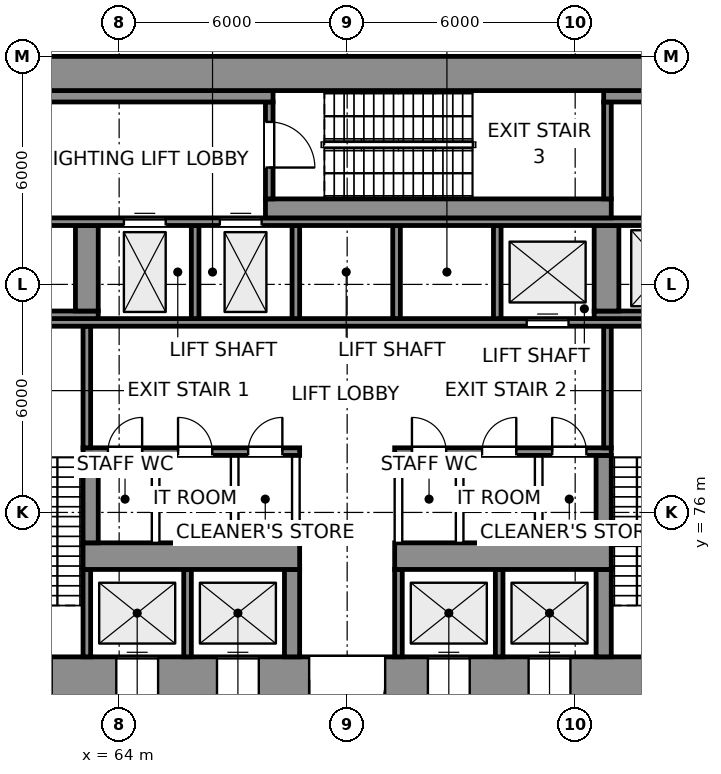
"""IFC4 building model, lengths in metres.
Left out: names, types, materials, properties, quantities, classifications, styles, units other than length and angle.
Written with IfcOpenShell. Run it as: python <this file> out.ifc"""

import sys

from ifc_helpers import new_model, si_unit, direction, frame, frame_2d, origin, place, context, subcontext, project, spatial, rectangle, extrude, element, fill, save


model = new_model("IFC4")
c1 = context("Model", 3, precision=1e-05, world=origin(), true_north=direction((0.0, 1.0)))
c2 = subcontext(c1, "Body", "Model", "MODEL_VIEW")
j1 = project(units=[si_unit("LENGTHUNIT", "METRE"), si_unit("PLANEANGLEUNIT", "RADIAN")], contexts=[c1])
p1 = place(None, origin())
s1 = spatial("IfcSite", under=j1, at=p1, CompositionType="ELEMENT")
p2 = place(p1, origin())
s2 = spatial("IfcBuilding", under=s1, at=p2, CompositionType="ELEMENT")
p3 = place(p2, frame((0.0, 0.0, 9.0)))
s3 = spatial("IfcBuildingStorey", under=s2, at=p3, CompositionType="ELEMENT", Elevation=9.0)
p4 = place(p3, frame((59.0, 71.6, 0.0), z_axis=(0.0, 0.0, 1.0), x_axis=(1.0, 0.0, 0.0)))
e1 = element("IfcWall", 1, at=p4, inside=s3, PredefinedType="SHEAR", context=c2, shape_type="SweptSolid", body=[
    extrude(rectangle(XDim=22.0, YDim=1.2, at=frame_2d((11.0, 0.0))), origin(), (0.0, 0.0, 1.0), 6.0),
])
p5 = place(p4, frame((2.025, 0.0, 0.0)))
e2 = element("IfcOpeningElement", 2, at=p5, cuts=e1, PredefinedType="OPENING", context=c2, shape_type="SweptSolid", body=[
    extrude(rectangle(XDim=1.2, YDim=2.1, at=frame_2d((0.6, 1.05))), frame((0.0, 0.61, 0.0), z_axis=(0.0, -1.0, 0.0), x_axis=(1.0, 0.0, 0.0)), (0.0, 0.0, 1.0), 1.22),
])
p6 = place(p4, frame((18.775, 0.0, 0.0)))
e3 = element("IfcOpeningElement", 3, at=p6, cuts=e1, PredefinedType="OPENING", context=c2, shape_type="SweptSolid", body=[
    extrude(rectangle(XDim=1.2, YDim=2.1, at=frame_2d((0.6, 1.05))), frame((0.0, 0.61, 0.0), z_axis=(0.0, -1.0, 0.0), x_axis=(1.0, 0.0, 0.0)), (0.0, 0.0, 1.0), 1.22),
])
p7 = place(p4, frame((10.0, 0.0, 0.0)))
e4 = element("IfcOpeningElement", 4, at=p7, cuts=e1, PredefinedType="OPENING", context=c2, shape_type="SweptSolid", body=[
    extrude(rectangle(XDim=2.0, YDim=2.1, at=frame_2d((1.0, 1.05))), frame((0.0, 0.61, 0.0), z_axis=(0.0, -1.0, 0.0), x_axis=(1.0, 0.0, 0.0)), (0.0, 0.0, 1.0), 1.22),
])
p8 = place(p4, frame((4.925, 0.0, 0.0)))
e5 = element("IfcOpeningElement", 5, at=p8, cuts=e1, PredefinedType="OPENING", context=c2, shape_type="SweptSolid", body=[
    extrude(rectangle(XDim=1.1, YDim=2.1, at=frame_2d((0.55, 1.05))), frame((0.0, 0.61, 0.0), z_axis=(0.0, -1.0, 0.0), x_axis=(1.0, 0.0, 0.0)), (0.0, 0.0, 1.0), 1.22),
])
p9 = place(p4, frame((7.575, 0.0, 0.0)))
e6 = element("IfcOpeningElement", 6, at=p9, cuts=e1, PredefinedType="OPENING", context=c2, shape_type="SweptSolid", body=[
    extrude(rectangle(XDim=1.1, YDim=2.1, at=frame_2d((0.55, 1.05))), frame((0.0, 0.61, 0.0), z_axis=(0.0, -1.0, 0.0), x_axis=(1.0, 0.0, 0.0)), (0.0, 0.0, 1.0), 1.22),
])
p10 = place(p4, frame((13.125, 0.0, 0.0)))
e7 = element("IfcOpeningElement", 7, at=p10, cuts=e1, PredefinedType="OPENING", context=c2, shape_type="SweptSolid", body=[
    extrude(rectangle(XDim=1.1, YDim=2.1, at=frame_2d((0.55, 1.05))), frame((0.0, 0.61, 0.0), z_axis=(0.0, -1.0, 0.0), x_axis=(1.0, 0.0, 0.0)), (0.0, 0.0, 1.0), 1.22),
])
p11 = place(p4, frame((15.775, 0.0, 0.0)))
e8 = element("IfcOpeningElement", 8, at=p11, cuts=e1, PredefinedType="OPENING", context=c2, shape_type="SweptSolid", body=[
    extrude(rectangle(XDim=1.1, YDim=2.1, at=frame_2d((0.55, 1.05))), frame((0.0, 0.61, 0.0), z_axis=(0.0, -1.0, 0.0), x_axis=(1.0, 0.0, 0.0)), (0.0, 0.0, 1.0), 1.22),
])
for number, where, z_axis, x_axis in (
    (9, (63.15, 72.2, 0.0), (0.0, 0.0, 1.0), (0.0, 1.0, 0.0)),
    (10, (65.8, 72.2, 0.0), (0.0, 0.0, 1.0), (0.0, 1.0, 0.0)),
):
    element("IfcWall", number, at=place(p3, frame(where, z_axis=z_axis, x_axis=x_axis)), inside=s3, PredefinedType="SHEAR", context=c2, shape_type="SweptSolid", body=[
        extrude(rectangle(XDim=2.3, YDim=0.2, at=frame_2d((1.15, 0.0))), origin(), (0.0, 0.0, 1.0), 6.0),
    ])
p12 = place(p3, frame((68.55, 72.2, 0.0), z_axis=(0.0, 0.0, 1.0), x_axis=(0.0, 1.0, 0.0)))
e11 = element("IfcWall", 11, at=p12, inside=s3, PredefinedType="SHEAR", context=c2, shape_type="SweptSolid", body=[
    extrude(rectangle(XDim=2.3, YDim=0.4, at=frame_2d((1.15, 0.0))), origin(), (0.0, 0.0, 1.0), 6.0),
])
for number, where, z_axis, x_axis in (
    (12, (71.35, 72.2, 0.0), (0.0, 0.0, 1.0), (0.0, 1.0, 0.0)),
    (13, (74.0, 72.2, 0.0), (0.0, 0.0, 1.0), (0.0, 1.0, 0.0)),
):
    element("IfcWall", number, at=place(p3, frame(where, z_axis=z_axis, x_axis=x_axis)), inside=s3, PredefinedType="SHEAR", context=c2, shape_type="SweptSolid", body=[
        extrude(rectangle(XDim=2.3, YDim=0.2, at=frame_2d((1.15, 0.0))), origin(), (0.0, 0.0, 1.0), 6.0),
    ])
p13 = place(p3, frame((76.75, 72.2, 0.0), z_axis=(0.0, 0.0, 1.0), x_axis=(0.0, 1.0, 0.0)))
e14 = element("IfcWall", 14, at=p13, inside=s3, PredefinedType="SHEAR", context=c2, shape_type="SweptSolid", body=[
    extrude(rectangle(XDim=2.3, YDim=0.4, at=frame_2d((1.15, 0.0))), origin(), (0.0, 0.0, 1.0), 6.0),
])
for number, where, z_axis, x_axis in (
    (15, (63.05, 74.85, 0.0), (0.0, 0.0, 1.0), (1.0, 0.0, 0.0)),
    (16, (71.25, 74.85, 0.0), (0.0, 0.0, 1.0), (1.0, 0.0, 0.0)),
):
    element("IfcWall", number, at=place(p3, frame(where, z_axis=z_axis, x_axis=x_axis)), inside=s3, PredefinedType="SHEAR", context=c2, shape_type="SweptSolid", body=[
        extrude(rectangle(XDim=5.7, YDim=0.7, at=frame_2d((2.85, 0.0))), origin(), (0.0, 0.0, 1.0), 6.0),
    ])
p14 = place(p3, frame((63.25, 75.2, 0.0), z_axis=(0.0, 0.0, 1.0), x_axis=(0.0, 1.0, 0.0)))
e17 = element("IfcWall", 17, at=p14, inside=s3, PredefinedType="SHEAR", context=c2, shape_type="SweptSolid", body=[
    extrude(rectangle(XDim=2.3, YDim=0.4, at=frame_2d((1.15, 0.0))), origin(), (0.0, 0.0, 1.0), 6.0),
])
for number, where, z_axis, x_axis in (
    (18, (64.96, 75.2, 0.0), (0.0, 0.0, 1.0), (0.0, 1.0, 0.0)),
    (19, (67.04, 75.2, 0.0), (0.0, 0.0, 1.0), (0.0, 1.0, 0.0)),
    (20, (68.65, 75.2, 0.0), (0.0, 0.0, 1.0), (0.0, 1.0, 0.0)),
    (21, (71.35, 75.2, 0.0), (0.0, 0.0, 1.0), (0.0, 1.0, 0.0)),
    (22, (72.96, 75.2, 0.0), (0.0, 0.0, 1.0), (0.0, 1.0, 0.0)),
    (23, (75.04, 75.2, 0.0), (0.0, 0.0, 1.0), (0.0, 1.0, 0.0)),
):
    element("IfcWall", number, at=place(p3, frame(where, z_axis=z_axis, x_axis=x_axis)), inside=s3, PredefinedType="PARTITIONING", context=c2, shape_type="SweptSolid", body=[
        extrude(rectangle(XDim=2.3, YDim=0.2, at=frame_2d((1.15, 0.0))), origin(), (0.0, 0.0, 1.0), 5.65),
    ])
p15 = place(p3, frame((76.75, 75.2, 0.0), z_axis=(0.0, 0.0, 1.0), x_axis=(0.0, 1.0, 0.0)))
e24 = element("IfcWall", 24, at=p15, inside=s3, PredefinedType="SHEAR", context=c2, shape_type="SweptSolid", body=[
    extrude(rectangle(XDim=2.3, YDim=0.4, at=frame_2d((1.15, 0.0))), origin(), (0.0, 0.0, 1.0), 6.0),
])
p16 = place(p3, frame((63.05, 77.6, 0.0), z_axis=(0.0, 0.0, 1.0), x_axis=(1.0, 0.0, 0.0)))
e25 = element("IfcWall", 25, at=p16, inside=s3, PredefinedType="SHEAR", context=c2, shape_type="SweptSolid", body=[
    extrude(rectangle(XDim=5.7, YDim=0.2, at=frame_2d((2.85, 0.0))), origin(), (0.0, 0.0, 1.0), 6.0),
])
p17 = place(p16, frame((0.655, 0.0, 0.0)))
e26 = element("IfcOpeningElement", 26, at=p17, cuts=e25, PredefinedType="OPENING", context=c2, shape_type="SweptSolid", body=[
    extrude(rectangle(XDim=0.9, YDim=2.1, at=frame_2d((0.45, 1.05))), frame((0.0, 0.11, 0.0), z_axis=(0.0, -1.0, 0.0), x_axis=(1.0, 0.0, 0.0)), (0.0, 0.0, 1.0), 0.22),
])
p18 = place(p16, frame((2.5, 0.0, 0.0)))
e27 = element("IfcOpeningElement", 27, at=p18, cuts=e25, PredefinedType="OPENING", context=c2, shape_type="SweptSolid", body=[
    extrude(rectangle(XDim=0.9, YDim=2.1, at=frame_2d((0.45, 1.05))), frame((0.0, 0.11, 0.0), z_axis=(0.0, -1.0, 0.0), x_axis=(1.0, 0.0, 0.0)), (0.0, 0.0, 1.0), 0.22),
])
p19 = place(p16, frame((4.345, 0.0, 0.0)))
e28 = element("IfcOpeningElement", 28, at=p19, cuts=e25, PredefinedType="OPENING", context=c2, shape_type="SweptSolid", body=[
    extrude(rectangle(XDim=0.9, YDim=2.1, at=frame_2d((0.45, 1.05))), frame((0.0, 0.11, 0.0), z_axis=(0.0, -1.0, 0.0), x_axis=(1.0, 0.0, 0.0)), (0.0, 0.0, 1.0), 0.22),
])
p20 = place(p3, frame((71.25, 77.6, 0.0), z_axis=(0.0, 0.0, 1.0), x_axis=(1.0, 0.0, 0.0)))
e29 = element("IfcWall", 29, at=p20, inside=s3, PredefinedType="SHEAR", context=c2, shape_type="SweptSolid", body=[
    extrude(rectangle(XDim=5.7, YDim=0.2, at=frame_2d((2.85, 0.0))), origin(), (0.0, 0.0, 1.0), 6.0),
])
p21 = place(p20, frame((0.455, 0.0, 0.0)))
e30 = element("IfcOpeningElement", 30, at=p21, cuts=e29, PredefinedType="OPENING", context=c2, shape_type="SweptSolid", body=[
    extrude(rectangle(XDim=0.9, YDim=2.1, at=frame_2d((0.45, 1.05))), frame((0.0, 0.11, 0.0), z_axis=(0.0, -1.0, 0.0), x_axis=(1.0, 0.0, 0.0)), (0.0, 0.0, 1.0), 0.22),
])
p22 = place(p20, frame((2.3, 0.0, 0.0)))
e31 = element("IfcOpeningElement", 31, at=p22, cuts=e29, PredefinedType="OPENING", context=c2, shape_type="SweptSolid", body=[
    extrude(rectangle(XDim=0.9, YDim=2.1, at=frame_2d((0.45, 1.05))), frame((0.0, 0.11, 0.0), z_axis=(0.0, -1.0, 0.0), x_axis=(1.0, 0.0, 0.0)), (0.0, 0.0, 1.0), 0.22),
])
p23 = place(p20, frame((4.145, 0.0, 0.0)))
e32 = element("IfcOpeningElement", 32, at=p23, cuts=e29, PredefinedType="OPENING", context=c2, shape_type="SweptSolid", body=[
    extrude(rectangle(XDim=0.9, YDim=2.1, at=frame_2d((0.45, 1.05))), frame((0.0, 0.11, 0.0), z_axis=(0.0, -1.0, 0.0), x_axis=(1.0, 0.0, 0.0)), (0.0, 0.0, 1.0), 0.22),
])
for number, where, z_axis, x_axis in (
    (33, (63.15, 77.7, 0.0), (0.0, 0.0, 1.0), (0.0, 1.0, 0.0)),
    (34, (76.85, 77.7, 0.0), (0.0, 0.0, 1.0), (0.0, 1.0, 0.0)),
):
    element("IfcWall", number, at=place(p3, frame(where, z_axis=z_axis, x_axis=x_axis)), inside=s3, PredefinedType="SHEAR", context=c2, shape_type="SweptSolid", body=[
        extrude(rectangle(XDim=3.2, YDim=0.2, at=frame_2d((1.6, 0.0))), origin(), (0.0, 0.0, 1.0), 6.0),
    ])
p24 = place(p3, frame((59.0, 81.0, 0.0), z_axis=(0.0, 0.0, 1.0), x_axis=(1.0, 0.0, 0.0)))
e35 = element("IfcWall", 35, at=p24, inside=s3, PredefinedType="SHEAR", context=c2, shape_type="SweptSolid", body=[
    extrude(rectangle(XDim=22.0, YDim=0.2, at=frame_2d((11.0, 0.0))), origin(), (0.0, 0.0, 1.0), 6.0),
])
p25 = place(p24, frame((15.725, 0.0, 0.0)))
e36 = element("IfcOpeningElement", 36, at=p25, cuts=e35, PredefinedType="OPENING", context=c2, shape_type="SweptSolid", body=[
    extrude(rectangle(XDim=1.1, YDim=2.1, at=frame_2d((0.55, 1.05))), frame((0.0, 0.11, 0.0), z_axis=(0.0, -1.0, 0.0), x_axis=(1.0, 0.0, 0.0)), (0.0, 0.0, 1.0), 0.22),
])
p26 = place(p3, frame((59.0, 81.2, 0.0), z_axis=(0.0, 0.0, 1.0), x_axis=(1.0, 0.0, 0.0)))
e37 = element("IfcWall", 37, at=p26, inside=s3, PredefinedType="SHEAR", context=c2, shape_type="SweptSolid", body=[
    extrude(rectangle(XDim=4.45, YDim=0.2, at=frame_2d((2.225, 0.0))), origin(), (0.0, 0.0, 1.0), 6.0),
])
for number, where, z_axis, x_axis in (
    (38, (66.0, 81.1, 0.0), (0.0, 0.0, 1.0), (0.0, 1.0, 0.0)),
    (39, (68.65, 81.1, 0.0), (0.0, 0.0, 1.0), (0.0, 1.0, 0.0)),
    (40, (71.3, 81.1, 0.0), (0.0, 0.0, 1.0), (0.0, 1.0, 0.0)),
    (41, (73.95, 81.1, 0.0), (0.0, 0.0, 1.0), (0.0, 1.0, 0.0)),
):
    element("IfcWall", number, at=place(p3, frame(where, z_axis=z_axis, x_axis=x_axis)), inside=s3, PredefinedType="SHEAR", context=c2, shape_type="SweptSolid", body=[
        extrude(rectangle(XDim=2.45, YDim=0.2, at=frame_2d((1.225, 0.0))), origin(), (0.0, 0.0, 1.0), 6.0),
    ])
p27 = place(p3, frame((76.5, 81.2, 0.0), z_axis=(0.0, 0.0, 1.0), x_axis=(1.0, 0.0, 0.0)))
e42 = element("IfcWall", 42, at=p27, inside=s3, PredefinedType="SHEAR", context=c2, shape_type="SweptSolid", body=[
    extrude(rectangle(XDim=4.5, YDim=0.2, at=frame_2d((2.25, 0.0))), origin(), (0.0, 0.0, 1.0), 6.0),
])
p28 = place(p3, frame((63.15, 81.3, 0.0), z_axis=(0.0, 0.0, 1.0), x_axis=(0.0, 1.0, 0.0)))
e43 = element("IfcWall", 43, at=p28, inside=s3, PredefinedType="SHEAR", context=c2, shape_type="SweptSolid", body=[
    extrude(rectangle(XDim=2.25, YDim=0.6, at=frame_2d((1.125, 0.0))), origin(), (0.0, 0.0, 1.0), 6.0),
])
p29 = place(p3, frame((76.825, 81.3, 0.0), z_axis=(0.0, 0.0, 1.0), x_axis=(0.0, 1.0, 0.0)))
e44 = element("IfcWall", 44, at=p29, inside=s3, PredefinedType="SHEAR", context=c2, shape_type="SweptSolid", body=[
    extrude(rectangle(XDim=2.25, YDim=0.65, at=frame_2d((1.125, 0.0))), origin(), (0.0, 0.0, 1.0), 6.0),
])
p30 = place(p3, frame((59.0, 83.65, 0.0), z_axis=(0.0, 0.0, 1.0), x_axis=(1.0, 0.0, 0.0)))
e45 = element("IfcWall", 45, at=p30, inside=s3, PredefinedType="SHEAR", context=c2, shape_type="SweptSolid", body=[
    extrude(rectangle(XDim=22.0, YDim=0.2, at=frame_2d((11.0, 0.0))), origin(), (0.0, 0.0, 1.0), 6.0),
])
p31 = place(p30, frame((5.125, 0.0, 0.0)))
e46 = element("IfcOpeningElement", 46, at=p31, cuts=e45, PredefinedType="OPENING", context=c2, shape_type="SweptSolid", body=[
    extrude(rectangle(XDim=1.1, YDim=2.1, at=frame_2d((0.55, 1.05))), frame((0.0, 0.11, 0.0), z_axis=(0.0, -1.0, 0.0), x_axis=(1.0, 0.0, 0.0)), (0.0, 0.0, 1.0), 0.22),
])
p32 = place(p30, frame((7.65, 0.0, 0.0)))
e47 = element("IfcOpeningElement", 47, at=p32, cuts=e45, PredefinedType="OPENING", context=c2, shape_type="SweptSolid", body=[
    extrude(rectangle(XDim=1.1, YDim=2.1, at=frame_2d((0.55, 1.05))), frame((0.0, 0.11, 0.0), z_axis=(0.0, -1.0, 0.0), x_axis=(1.0, 0.0, 0.0)), (0.0, 0.0, 1.0), 0.22),
])
p33 = place(p30, frame((18.775, 0.0, 0.0)))
e48 = element("IfcOpeningElement", 48, at=p33, cuts=e45, PredefinedType="OPENING", context=c2, shape_type="SweptSolid", body=[
    extrude(rectangle(XDim=1.2, YDim=2.1, at=frame_2d((0.6, 1.05))), frame((0.0, 0.11, 0.0), z_axis=(0.0, -1.0, 0.0), x_axis=(1.0, 0.0, 0.0)), (0.0, 0.0, 1.0), 0.22),
])
p34 = place(p30, frame((2.075, 0.0, 0.0)))
e49 = element("IfcOpeningElement", 49, at=p34, cuts=e45, PredefinedType="OPENING", context=c2, shape_type="SweptSolid", body=[
    extrude(rectangle(XDim=1.1, YDim=2.1, at=frame_2d((0.55, 1.05))), frame((0.0, 0.11, 0.0), z_axis=(0.0, -1.0, 0.0), x_axis=(1.0, 0.0, 0.0)), (0.0, 0.0, 1.0), 0.22),
])
p35 = place(p3, frame((67.85, 84.0, 0.0), z_axis=(0.0, 0.0, 1.0), x_axis=(1.0, 0.0, 0.0)))
e50 = element("IfcWall", 50, at=p35, inside=s3, PredefinedType="SHEAR", context=c2, shape_type="SweptSolid", body=[
    extrude(rectangle(XDim=9.1, YDim=0.5, at=frame_2d((4.55, 0.0))), origin(), (0.0, 0.0, 1.0), 6.0),
])
p36 = place(p3, frame((67.95, 84.25, 0.0), z_axis=(0.0, 0.0, 1.0), x_axis=(0.0, 1.0, 0.0)))
e51 = element("IfcWall", 51, at=p36, inside=s3, PredefinedType="SHEAR", context=c2, shape_type="SweptSolid", body=[
    extrude(rectangle(XDim=2.55, YDim=0.2, at=frame_2d((1.275, 0.0))), origin(), (0.0, 0.0, 1.0), 6.0),
])
p37 = place(p36, frame((0.825, 0.0, 0.0)))
e52 = element("IfcOpeningElement", 52, at=p37, cuts=e51, PredefinedType="OPENING", context=c2, shape_type="SweptSolid", body=[
    extrude(rectangle(XDim=1.2, YDim=2.1, at=frame_2d((0.6, 1.05))), frame((0.0, 0.11, 0.0), z_axis=(0.0, -1.0, 0.0), x_axis=(1.0, 0.0, 0.0)), (0.0, 0.0, 1.0), 0.22),
])
p38 = place(p3, frame((76.85, 84.25, 0.0), z_axis=(0.0, 0.0, 1.0), x_axis=(0.0, 1.0, 0.0)))
e53 = element("IfcWall", 53, at=p38, inside=s3, PredefinedType="SHEAR", context=c2, shape_type="SweptSolid", body=[
    extrude(rectangle(XDim=2.55, YDim=0.2, at=frame_2d((1.275, 0.0))), origin(), (0.0, 0.0, 1.0), 6.0),
])
p39 = place(p3, frame((59.0, 86.95, 0.0), z_axis=(0.0, 0.0, 1.0), x_axis=(1.0, 0.0, 0.0)))
e54 = element("IfcWall", 54, at=p39, inside=s3, PredefinedType="SHEAR", context=c2, shape_type="SweptSolid", body=[
    extrude(rectangle(XDim=9.05, YDim=0.3, at=frame_2d((4.525, 0.0))), origin(), (0.0, 0.0, 1.0), 6.0),
])
p40 = place(p3, frame((76.75, 86.95, 0.0), z_axis=(0.0, 0.0, 1.0), x_axis=(1.0, 0.0, 0.0)))
e55 = element("IfcWall", 55, at=p40, inside=s3, PredefinedType="SHEAR", context=c2, shape_type="SweptSolid", body=[
    extrude(rectangle(XDim=4.25, YDim=0.3, at=frame_2d((2.125, 0.0))), origin(), (0.0, 0.0, 1.0), 6.0),
])
p41 = place(p3, frame((59.0, 87.55, 0.0), z_axis=(0.0, 0.0, 1.0), x_axis=(1.0, 0.0, 0.0)))
e56 = element("IfcWall", 56, at=p41, inside=s3, PredefinedType="SHEAR", context=c2, shape_type="SweptSolid", body=[
    extrude(rectangle(XDim=22.0, YDim=0.9, at=frame_2d((11.0, 0.0))), origin(), (0.0, 0.0, 1.0), 6.0),
])
p42 = place(p37, frame((1.2, 0.0, 0.0), z_axis=(0.0, 0.0, 1.0), x_axis=(-1.0, 0.0, 0.0)))
e57 = element("IfcDoor", 57, at=p42, inside=s3, OperationType="SINGLE_SWING_RIGHT", PredefinedType="DOOR", context=c2, shape_type="SweptSolid", body=[
    extrude(rectangle(XDim=1.2, YDim=2.1, at=frame_2d((0.6, 1.05))), frame((0.0, 0.025, 0.0), z_axis=(0.0, -1.0, 0.0), x_axis=(1.0, 0.0, 0.0)), (0.0, 0.0, 1.0), 0.05),
])
fill(e52, e57)
p43 = place(p7, frame((2.0, 0.0, 0.0), z_axis=(0.0, 0.0, 1.0), x_axis=(-1.0, 0.0, 0.0)))
e58 = element("IfcDoor", 58, at=p43, inside=s3, OperationType="DOUBLE_DOOR_SINGLE_SWING", PredefinedType="DOOR", context=c2, shape_type="SweptSolid", body=[
    extrude(rectangle(XDim=2.0, YDim=2.1, at=frame_2d((1.0, 1.05))), frame((0.0, 0.025, 0.0), z_axis=(0.0, -1.0, 0.0), x_axis=(1.0, 0.0, 0.0)), (0.0, 0.0, 1.0), 0.05),
])
fill(e4, e58)
p44 = place(p31, origin())
e59 = element("IfcDoor", 59, at=p44, inside=s3, OperationType="DOUBLE_DOOR_SLIDING", PredefinedType="DOOR", context=c2, shape_type="SweptSolid", body=[
    extrude(rectangle(XDim=1.1, YDim=2.1, at=frame_2d((0.55, 1.05))), frame((0.0, 0.025, 0.0), z_axis=(0.0, -1.0, 0.0), x_axis=(1.0, 0.0, 0.0)), (0.0, 0.0, 1.0), 0.05),
])
fill(e46, e59)
p45 = place(p32, origin())
e60 = element("IfcDoor", 60, at=p45, inside=s3, OperationType="DOUBLE_DOOR_SLIDING", PredefinedType="DOOR", context=c2, shape_type="SweptSolid", body=[
    extrude(rectangle(XDim=1.1, YDim=2.1, at=frame_2d((0.55, 1.05))), frame((0.0, 0.025, 0.0), z_axis=(0.0, -1.0, 0.0), x_axis=(1.0, 0.0, 0.0)), (0.0, 0.0, 1.0), 0.05),
])
fill(e47, e60)
p46 = place(p25, origin())
e61 = element("IfcDoor", 61, at=p46, inside=s3, OperationType="DOUBLE_DOOR_SLIDING", PredefinedType="DOOR", context=c2, shape_type="SweptSolid", body=[
    extrude(rectangle(XDim=1.1, YDim=2.1, at=frame_2d((0.55, 1.05))), frame((0.0, 0.025, 0.0), z_axis=(0.0, -1.0, 0.0), x_axis=(1.0, 0.0, 0.0)), (0.0, 0.0, 1.0), 0.05),
])
fill(e36, e61)
p47 = place(p8, origin())
e62 = element("IfcDoor", 62, at=p47, inside=s3, OperationType="DOUBLE_DOOR_SLIDING", PredefinedType="DOOR", context=c2, shape_type="SweptSolid", body=[
    extrude(rectangle(XDim=1.1, YDim=2.1, at=frame_2d((0.55, 1.05))), frame((0.0, 0.025, 0.0), z_axis=(0.0, -1.0, 0.0), x_axis=(1.0, 0.0, 0.0)), (0.0, 0.0, 1.0), 0.05),
])
fill(e5, e62)
p48 = place(p9, origin())
e63 = element("IfcDoor", 63, at=p48, inside=s3, OperationType="DOUBLE_DOOR_SLIDING", PredefinedType="DOOR", context=c2, shape_type="SweptSolid", body=[
    extrude(rectangle(XDim=1.1, YDim=2.1, at=frame_2d((0.55, 1.05))), frame((0.0, 0.025, 0.0), z_axis=(0.0, -1.0, 0.0), x_axis=(1.0, 0.0, 0.0)), (0.0, 0.0, 1.0), 0.05),
])
fill(e6, e63)
p49 = place(p10, origin())
e64 = element("IfcDoor", 64, at=p49, inside=s3, OperationType="DOUBLE_DOOR_SLIDING", PredefinedType="DOOR", context=c2, shape_type="SweptSolid", body=[
    extrude(rectangle(XDim=1.1, YDim=2.1, at=frame_2d((0.55, 1.05))), frame((0.0, 0.025, 0.0), z_axis=(0.0, -1.0, 0.0), x_axis=(1.0, 0.0, 0.0)), (0.0, 0.0, 1.0), 0.05),
])
fill(e7, e64)
p50 = place(p11, origin())
e65 = element("IfcDoor", 65, at=p50, inside=s3, OperationType="DOUBLE_DOOR_SLIDING", PredefinedType="DOOR", context=c2, shape_type="SweptSolid", body=[
    extrude(rectangle(XDim=1.1, YDim=2.1, at=frame_2d((0.55, 1.05))), frame((0.0, 0.025, 0.0), z_axis=(0.0, -1.0, 0.0), x_axis=(1.0, 0.0, 0.0)), (0.0, 0.0, 1.0), 0.05),
])
fill(e8, e65)
p51 = place(p17, origin())
e66 = element("IfcDoor", 66, at=p51, inside=s3, OperationType="SINGLE_SWING_RIGHT", PredefinedType="DOOR", context=c2, shape_type="SweptSolid", body=[
    extrude(rectangle(XDim=0.9, YDim=2.1, at=frame_2d((0.45, 1.05))), frame((0.0, 0.025, 0.0), z_axis=(0.0, -1.0, 0.0), x_axis=(1.0, 0.0, 0.0)), (0.0, 0.0, 1.0), 0.05),
])
fill(e26, e66)
p52 = place(p18, origin())
e67 = element("IfcDoor", 67, at=p52, inside=s3, OperationType="SINGLE_SWING_LEFT", PredefinedType="DOOR", context=c2, shape_type="SweptSolid", body=[
    extrude(rectangle(XDim=0.9, YDim=2.1, at=frame_2d((0.45, 1.05))), frame((0.0, 0.025, 0.0), z_axis=(0.0, -1.0, 0.0), x_axis=(1.0, 0.0, 0.0)), (0.0, 0.0, 1.0), 0.05),
])
fill(e27, e67)
p53 = place(p19, origin())
e68 = element("IfcDoor", 68, at=p53, inside=s3, OperationType="SINGLE_SWING_RIGHT", PredefinedType="DOOR", context=c2, shape_type="SweptSolid", body=[
    extrude(rectangle(XDim=0.9, YDim=2.1, at=frame_2d((0.45, 1.05))), frame((0.0, 0.025, 0.0), z_axis=(0.0, -1.0, 0.0), x_axis=(1.0, 0.0, 0.0)), (0.0, 0.0, 1.0), 0.05),
])
fill(e28, e68)
p54 = place(p21, origin())
e69 = element("IfcDoor", 69, at=p54, inside=s3, OperationType="SINGLE_SWING_LEFT", PredefinedType="DOOR", context=c2, shape_type="SweptSolid", body=[
    extrude(rectangle(XDim=0.9, YDim=2.1, at=frame_2d((0.45, 1.05))), frame((0.0, 0.025, 0.0), z_axis=(0.0, -1.0, 0.0), x_axis=(1.0, 0.0, 0.0)), (0.0, 0.0, 1.0), 0.05),
])
fill(e30, e69)
p55 = place(p22, origin())
e70 = element("IfcDoor", 70, at=p55, inside=s3, OperationType="SINGLE_SWING_RIGHT", PredefinedType="DOOR", context=c2, shape_type="SweptSolid", body=[
    extrude(rectangle(XDim=0.9, YDim=2.1, at=frame_2d((0.45, 1.05))), frame((0.0, 0.025, 0.0), z_axis=(0.0, -1.0, 0.0), x_axis=(1.0, 0.0, 0.0)), (0.0, 0.0, 1.0), 0.05),
])
fill(e31, e70)
p56 = place(p23, origin())
e71 = element("IfcDoor", 71, at=p56, inside=s3, OperationType="SINGLE_SWING_LEFT", PredefinedType="DOOR", context=c2, shape_type="SweptSolid", body=[
    extrude(rectangle(XDim=0.9, YDim=2.1, at=frame_2d((0.45, 1.05))), frame((0.0, 0.025, 0.0), z_axis=(0.0, -1.0, 0.0), x_axis=(1.0, 0.0, 0.0)), (0.0, 0.0, 1.0), 0.05),
])
fill(e32, e71)
save(model, sys.argv[1])
